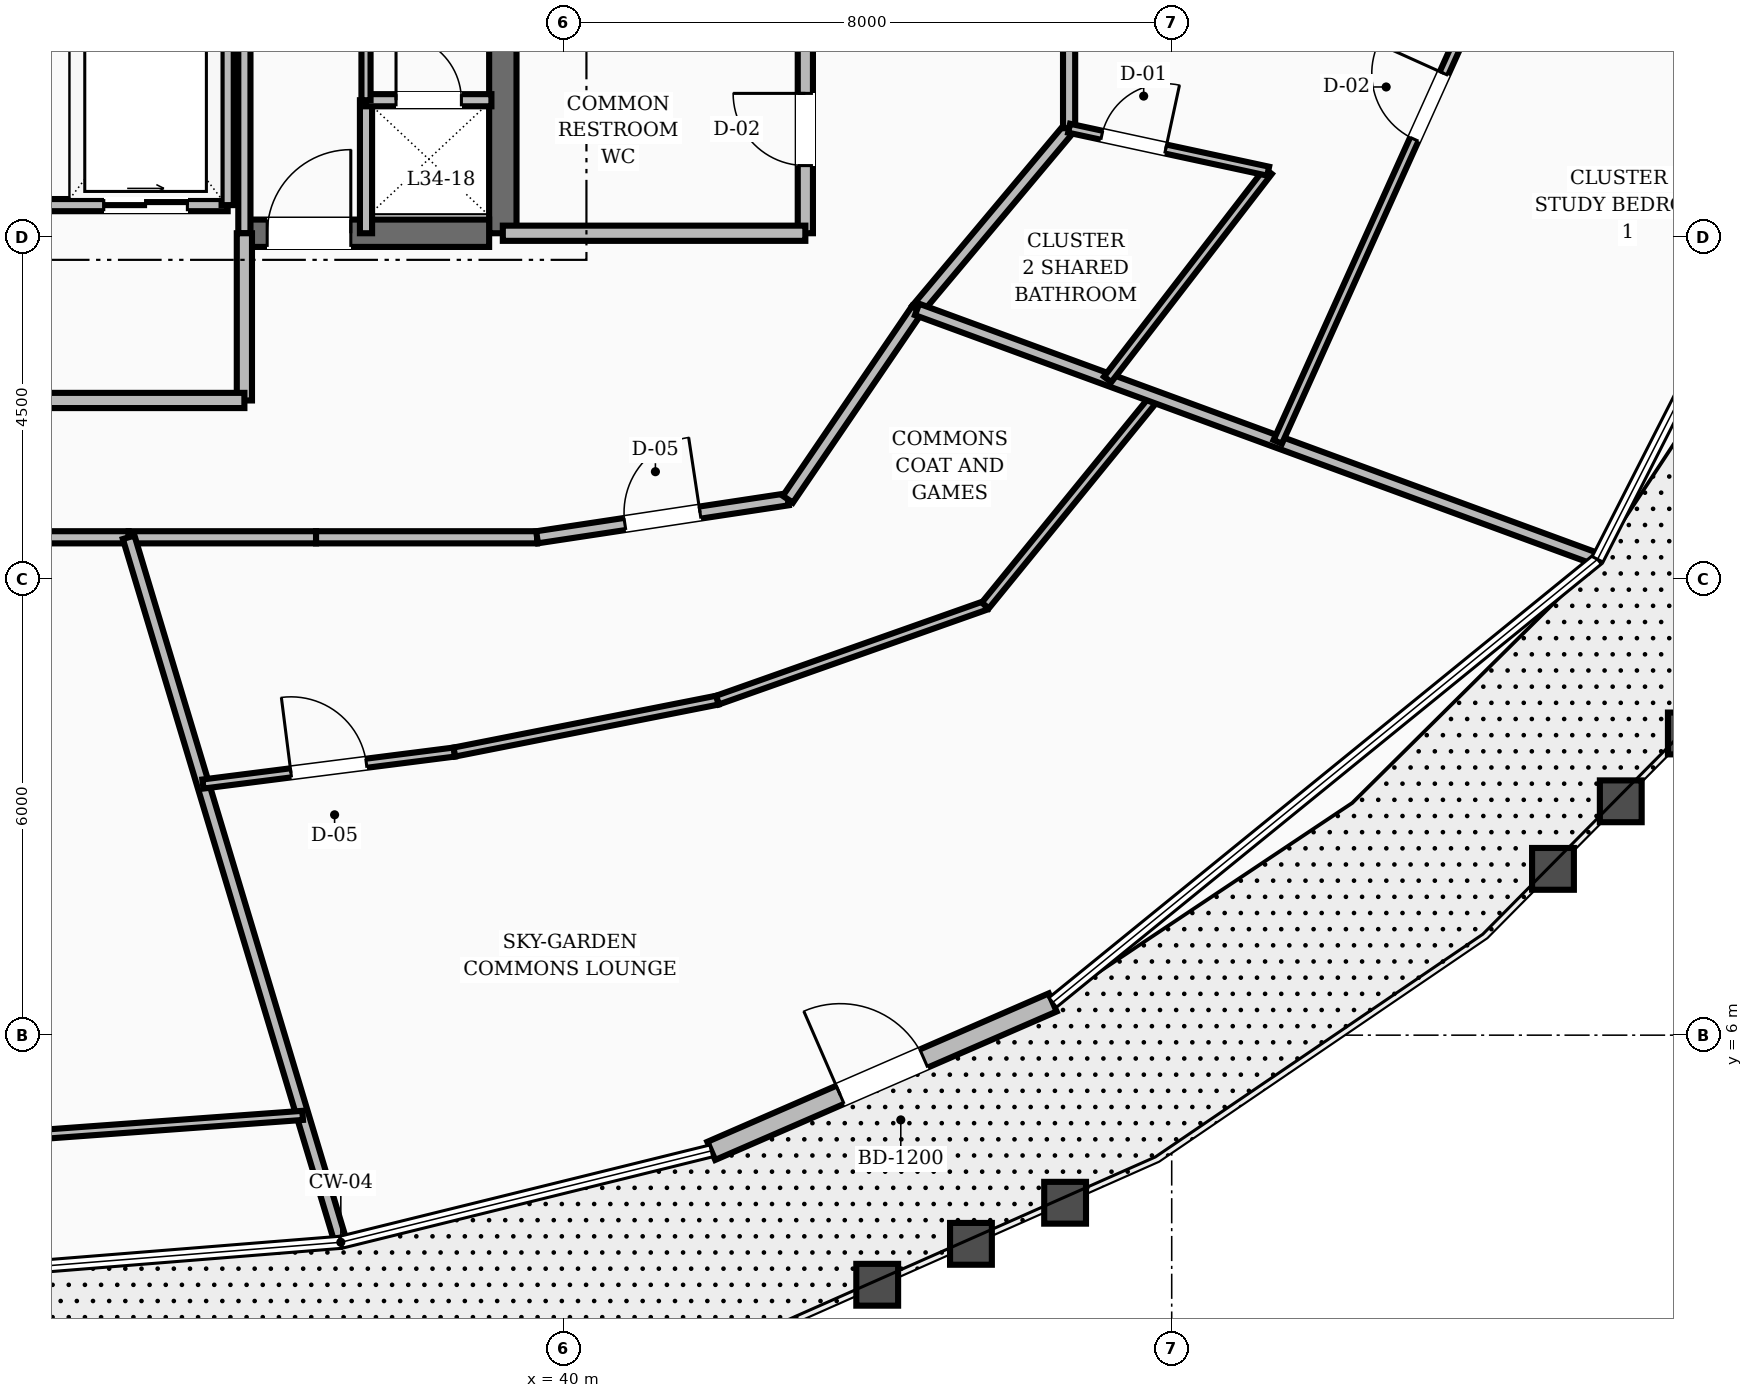
"""IFC4 building model, lengths in metres.
Left out: names, types, materials, properties, quantities, classifications, styles, units other than length and angle.
Written with IfcOpenShell. Run it as: python <this file> out.ifc"""

import sys

from ifc_helpers import new_model, si_unit, direction, frame, frame_2d, origin, place, context, subcontext, project, spatial, rectangle, extrude, element, fill, save


model = new_model("IFC4")
c1 = context("Model", 3, precision=1e-05, world=origin(), true_north=direction((0.0, 1.0)))
c2 = subcontext(c1, "Body", "Model", "MODEL_VIEW")
j1 = project(units=[si_unit("LENGTHUNIT", "METRE"), si_unit("PLANEANGLEUNIT", "RADIAN")], contexts=[c1])
p1 = place(None, origin())
s1 = spatial("IfcSite", under=j1, at=p1, CompositionType="ELEMENT")
p2 = place(p1, origin())
s2 = spatial("IfcBuilding", under=s1, at=p2, CompositionType="ELEMENT")
p3 = place(p2, frame((0.0, 0.0, 135.2)))
s3 = spatial("IfcBuildingStorey", under=s2, at=p3, CompositionType="ELEMENT", Elevation=135.2)
p4 = place(p3, frame((39.2, 16.55, 0.0), z_axis=(0.0, 0.0, 1.0), x_axis=(0.0, 1.0, 0.0)))
e1 = element("IfcWall", 1, at=p4, inside=s3, PredefinedType="SHEAR", context=c2, shape_type="SweptSolid", body=[
    extrude(rectangle(XDim=6.3, YDim=0.36, at=frame_2d((3.15, 0.0))), origin(), (0.0, 0.0, 1.0), 3.6),
])
p5 = place(p3, frame((35.8, 16.55, 0.0), z_axis=(0.0, 0.0, 1.0), x_axis=(1.0, 0.0, 0.0)))
e2 = element("IfcWall", 2, at=p5, inside=s3, PredefinedType="SHEAR", context=c2, shape_type="SweptSolid", body=[
    extrude(rectangle(XDim=3.22, YDim=0.36, at=frame_2d((1.61, 0.0))), origin(), (0.0, 0.0, 1.0), 3.6),
])
p6 = place(p5, frame((0.3, 0.0, 0.0)))
e3 = element("IfcOpeningElement", 3, at=p6, cuts=e2, PredefinedType="OPENING", context=c2, shape_type="SweptSolid", body=[
    extrude(rectangle(XDim=1.1, YDim=2.1, at=frame_2d((0.55, 1.05))), frame((0.0, 0.19, 0.0), z_axis=(0.0, -1.0, 0.0), x_axis=(1.0, 0.0, 0.0)), (0.0, 0.0, 1.0), 0.38),
])
p7 = place(p3, frame((41.943, 4.478, 0.0), z_axis=(0.0, 0.0, 1.0), x_axis=(0.917072433644, 0.39872064337, 0.0)))
e4 = element("IfcWall", 4, at=p7, inside=s3, PredefinedType="STANDARD", context=c2, shape_type="SweptSolid", body=[
    extrude(rectangle(XDim=4.898, YDim=0.26, at=frame_2d((2.449, 0.0))), origin(), (0.0, 0.0, 1.0), 2.82),
])
p8 = place(p7, frame((1.849, 0.0, 0.0)))
e5 = element("IfcOpeningElement", 5, at=p8, cuts=e4, PredefinedType="OPENING", context=c2, shape_type="SweptSolid", body=[
    extrude(rectangle(XDim=1.2, YDim=2.15, at=frame_2d((0.6, 1.075))), frame((0.0, 0.14, 0.0), z_axis=(0.0, -1.0, 0.0), x_axis=(1.0, 0.0, 0.0)), (0.0, 0.0, 1.0), 0.28),
])
p9 = place(p3, frame((43.18, 16.55, 0.0), z_axis=(0.0, 0.0, 1.0), x_axis=(0.0, 1.0, 0.0)))
e6 = element("IfcWall", 6, at=p9, inside=s3, PredefinedType="SOLIDWALL", context=c2, shape_type="SweptSolid", body=[
    extrude(rectangle(XDim=2.73, YDim=0.2, at=frame_2d((1.365, 0.0))), origin(), (0.0, 0.0, 1.0), 2.8),
])
p10 = place(p9, frame((0.89, 0.0, 0.0)))
e7 = element("IfcOpeningElement", 7, at=p10, cuts=e6, PredefinedType="OPENING", context=c2, shape_type="SweptSolid", body=[
    extrude(rectangle(XDim=0.95, YDim=2.1, at=frame_2d((0.475, 1.05))), frame((0.0, 0.11, 0.0), z_axis=(0.0, -1.0, 0.0), x_axis=(1.0, 0.0, 0.0)), (0.0, 0.0, 1.0), 0.22),
])
p11 = place(p3, frame((39.2, 16.55, 0.0), z_axis=(0.0, 0.0, 1.0), x_axis=(1.0, 0.0, 0.0)))
e8 = element("IfcWall", 8, at=p11, inside=s3, PredefinedType="SOLIDWALL", context=c2, shape_type="SweptSolid", body=[
    extrude(rectangle(XDim=3.98, YDim=0.2, at=frame_2d((1.99, 0.0))), origin(), (0.0, 0.0, 1.0), 2.8),
])
p12 = place(p3, frame((35.8, 16.55, 0.0), z_axis=(0.0, 0.0, 1.0), x_axis=(0.0, 1.0, 0.0)))
e9 = element("IfcWall", 9, at=p12, inside=s3, PredefinedType="SOLIDWALL", context=c2, shape_type="SweptSolid", body=[
    extrude(rectangle(XDim=3.3, YDim=0.16, at=frame_2d((1.65, 0.0))), origin(), (0.0, 0.0, 1.0), 2.8),
])
p13 = place(p3, frame((37.4, 16.55, 0.0), z_axis=(0.0, 0.0, 1.0), x_axis=(0.0, 1.0, 0.0)))
e10 = element("IfcWall", 10, at=p13, inside=s3, PredefinedType="SOLIDWALL", context=c2, shape_type="SweptSolid", body=[
    extrude(rectangle(XDim=1.75, YDim=0.16, at=frame_2d((0.875, 0.0))), origin(), (0.0, 0.0, 1.0), 2.8),
])
p14 = place(p3, frame((35.8, 14.35, 0.0), z_axis=(0.0, 0.0, 1.0), x_axis=(0.0, 1.0, 0.0)))
e11 = element("IfcWall", 11, at=p14, inside=s3, PredefinedType="SOLIDWALL", context=c2, shape_type="SweptSolid", body=[
    extrude(rectangle(XDim=2.2, YDim=0.2, at=frame_2d((1.1, 0.0))), origin(), (0.0, 0.0, 1.0), 2.8),
])
p15 = place(p3, frame((28.2, 14.35, 0.0), z_axis=(0.0, 0.0, 1.0), x_axis=(1.0, 0.0, 0.0)))
e12 = element("IfcWall", 12, at=p15, inside=s3, PredefinedType="SOLIDWALL", context=c2, shape_type="SweptSolid", body=[
    extrude(rectangle(XDim=7.6, YDim=0.2, at=frame_2d((3.8, 0.0))), origin(), (0.0, 0.0, 1.0), 2.8),
])
p16 = place(p15, frame((3.2, 0.0, 0.0)))
e13 = element("IfcOpeningElement", 13, at=p16, cuts=e12, PredefinedType="OPENING", context=c2, shape_type="SweptSolid", body=[
    extrude(rectangle(XDim=1.2, YDim=2.1, at=frame_2d((0.6, 1.05))), frame((0.0, 0.11, 0.0), z_axis=(0.0, -1.0, 0.0), x_axis=(1.0, 0.0, 0.0)), (0.0, 0.0, 1.0), 0.22),
])
p17 = place(p3, frame((28.42, 16.92, 0.0), z_axis=(0.0, 0.0, 1.0), x_axis=(1.0, 0.0, 0.0)))
e14 = element("IfcWall", 14, at=p17, inside=s3, PredefinedType="SOLIDWALL", context=c2, shape_type="SweptSolid", body=[
    extrude(rectangle(XDim=7.16, YDim=0.16, at=frame_2d((3.58, 0.0))), origin(), (0.0, 0.0, 1.0), 2.8),
])
p18 = place(p17, frame((0.53, 0.0, 0.0)))
e15 = element("IfcOpeningElement", 15, at=p18, cuts=e14, PredefinedType="OPENING", context=c2, shape_type="SweptSolid", body=[
    extrude(rectangle(XDim=1.1, YDim=2.15, at=frame_2d((0.55, 1.075))), frame((0.0, 0.09, 0.0), z_axis=(0.0, -1.0, 0.0), x_axis=(1.0, 0.0, 0.0)), (0.0, 0.0, 1.0), 0.18),
])
p19 = place(p17, frame((3.03, 0.0, 0.0)))
e16 = element("IfcOpeningElement", 16, at=p19, cuts=e14, PredefinedType="OPENING", context=c2, shape_type="SweptSolid", body=[
    extrude(rectangle(XDim=1.1, YDim=2.15, at=frame_2d((0.55, 1.075))), frame((0.0, 0.09, 0.0), z_axis=(0.0, -1.0, 0.0), x_axis=(1.0, 0.0, 0.0)), (0.0, 0.0, 1.0), 0.18),
])
p20 = place(p17, frame((5.53, 0.0, 0.0)))
e17 = element("IfcOpeningElement", 17, at=p20, cuts=e14, PredefinedType="OPENING", context=c2, shape_type="SweptSolid", body=[
    extrude(rectangle(XDim=1.1, YDim=2.15, at=frame_2d((0.55, 1.075))), frame((0.0, 0.09, 0.0), z_axis=(0.0, -1.0, 0.0), x_axis=(1.0, 0.0, 0.0)), (0.0, 0.0, 1.0), 0.18),
])
p21 = place(p3, frame((35.58, 16.92, 0.0), z_axis=(0.0, 0.0, 1.0), x_axis=(0.0, 1.0, 0.0)))
e18 = element("IfcWall", 18, at=p21, inside=s3, PredefinedType="SOLIDWALL", context=c2, shape_type="SweptSolid", body=[
    extrude(rectangle(XDim=2.76, YDim=0.16, at=frame_2d((1.38, 0.0))), origin(), (0.0, 0.0, 1.0), 2.8),
])
p22 = place(p3, frame((37.4, 18.3, 0.0), z_axis=(0.0, 0.0, 1.0), x_axis=(1.0, 0.0, 0.0)))
e19 = element("IfcWall", 19, at=p22, inside=s3, PredefinedType="SOLIDWALL", context=c2, shape_type="SweptSolid", body=[
    extrude(rectangle(XDim=1.65, YDim=0.16, at=frame_2d((0.825, 0.0))), origin(), (0.0, 0.0, 1.0), 2.8),
])
p23 = place(p22, frame((0.395, 0.0, 0.0)))
e20 = element("IfcOpeningElement", 20, at=p23, cuts=e19, PredefinedType="OPENING", context=c2, shape_type="SweptSolid", body=[
    extrude(rectangle(XDim=0.86, YDim=2.1, at=frame_2d((0.43, 1.05))), frame((0.0, 0.09, 0.0), z_axis=(0.0, -1.0, 0.0), x_axis=(1.0, 0.0, 0.0)), (0.0, 0.0, 1.0), 0.18),
])
p24 = place(p3, frame((37.4, 18.3, 0.0), z_axis=(0.0, 0.0, 1.0), x_axis=(0.0, 1.0, 0.0)))
e21 = element("IfcWall", 21, at=p24, inside=s3, PredefinedType="PARTITIONING", context=c2, shape_type="SweptSolid", body=[
    extrude(rectangle(XDim=4.45, YDim=0.12, at=frame_2d((2.225, 0.0))), origin(), (0.0, 0.0, 1.0), 2.8),
])
p25 = place(p24, frame((1.75, 0.0, 0.0)))
e22 = element("IfcOpeningElement", 22, at=p25, cuts=e21, PredefinedType="OPENING", context=c2, shape_type="SweptSolid", body=[
    extrude(rectangle(XDim=0.95, YDim=2.1, at=frame_2d((0.475, 1.05))), frame((0.0, 0.07, 0.0), z_axis=(0.0, -1.0, 0.0), x_axis=(1.0, 0.0, 0.0)), (0.0, 0.0, 1.0), 0.14),
])
p26 = place(p3, frame((32.0, 12.55, 0.0), z_axis=(0.0, 0.0, 1.0), x_axis=(1.0, 0.0, 0.0)))
e23 = element("IfcWall", 23, at=p26, inside=s3, PredefinedType="SOLIDWALL", context=c2, shape_type="SweptSolid", body=[
    extrude(rectangle(XDim=2.278, YDim=0.16, at=frame_2d((1.139, 0.0))), origin(), (0.0, 0.0, 1.0), 2.8),
])
p27 = place(p3, frame((34.278, 12.55, 0.0), z_axis=(0.0, 0.0, 1.0), x_axis=(1.0, 0.0, 0.0)))
e24 = element("IfcWall", 24, at=p27, inside=s3, PredefinedType="SOLIDWALL", context=c2, shape_type="SweptSolid", body=[
    extrude(rectangle(XDim=2.465, YDim=0.16, at=frame_2d((1.232, 0.0))), origin(), (0.0, 0.0, 1.0), 2.8),
])
p28 = place(p3, frame((36.743, 12.55, 0.0), z_axis=(0.0, 0.0, 1.0), x_axis=(1.0, 0.0, 0.0)))
e25 = element("IfcWall", 25, at=p28, inside=s3, PredefinedType="SOLIDWALL", context=c2, shape_type="SweptSolid", body=[
    extrude(rectangle(XDim=2.908, YDim=0.16, at=frame_2d((1.454, 0.0))), origin(), (0.0, 0.0, 1.0), 2.8),
])
p29 = place(p3, frame((39.651, 12.55, 0.0), z_axis=(0.0, 0.0, 1.0), x_axis=(0.988710906508, 0.149835721217, 0.0)))
e26 = element("IfcWall", 26, at=p29, inside=s3, PredefinedType="SOLIDWALL", context=c2, shape_type="SweptSolid", body=[
    extrude(rectangle(XDim=3.337, YDim=0.16, at=frame_2d((1.668, 0.0))), origin(), (0.0, 0.0, 1.0), 2.8),
])
p30 = place(p29, frame((1.168, 0.0, 0.0)))
e27 = element("IfcOpeningElement", 27, at=p30, cuts=e26, PredefinedType="OPENING", context=c2, shape_type="SweptSolid", body=[
    extrude(rectangle(XDim=1.0, YDim=2.1, at=frame_2d((0.5, 1.05))), frame((0.0, 0.09, 0.0), z_axis=(0.0, -1.0, 0.0), x_axis=(1.0, 0.0, 0.0)), (0.0, 0.0, 1.0), 0.18),
])
p31 = place(p3, frame((42.95, 13.05, 0.0), z_axis=(0.0, 0.0, 1.0), x_axis=(0.562674669208, 0.826678423955, 0.0)))
e28 = element("IfcWall", 28, at=p31, inside=s3, PredefinedType="SOLIDWALL", context=c2, shape_type="SweptSolid", body=[
    extrude(rectangle(XDim=3.021, YDim=0.16, at=frame_2d((1.511, 0.0))), origin(), (0.0, 0.0, 1.0), 2.8),
])
p32 = place(p3, frame((44.65, 15.548, 0.0), z_axis=(0.0, 0.0, 1.0), x_axis=(0.642665742791, 0.76614668507, 0.0)))
e29 = element("IfcWall", 29, at=p32, inside=s3, PredefinedType="SOLIDWALL", context=c2, shape_type="SweptSolid", body=[
    extrude(rectangle(XDim=3.112, YDim=0.16, at=frame_2d((1.556, 0.0))), origin(), (0.0, 0.0, 1.0), 2.8),
])
p33 = place(p3, frame((46.65, 17.932, 0.0), z_axis=(0.0, 0.0, 1.0), x_axis=(0.0, 1.0, 0.0)))
e30 = element("IfcWall", 30, at=p33, inside=s3, PredefinedType="SOLIDWALL", context=c2, shape_type="SweptSolid", body=[
    extrude(rectangle(XDim=3.154, YDim=0.16, at=frame_2d((1.577, 0.0))), origin(), (0.0, 0.0, 1.0), 2.8),
])
p34 = place(p33, frame((1.077, 0.0, 0.0)))
e31 = element("IfcOpeningElement", 31, at=p34, cuts=e30, PredefinedType="OPENING", context=c2, shape_type="SweptSolid", body=[
    extrude(rectangle(XDim=1.0, YDim=2.1, at=frame_2d((0.5, 1.05))), frame((0.0, 0.09, 0.0), z_axis=(0.0, -1.0, 0.0), x_axis=(1.0, 0.0, 0.0)), (0.0, 0.0, 1.0), 0.18),
])
p35 = place(p3, frame((34.278, 12.55, 0.0), z_axis=(0.0, 0.0, 1.0), x_axis=(0.288156704698, -0.957583267156, 0.0)))
e32 = element("IfcWall", 32, at=p35, inside=s3, PredefinedType="SOLIDWALL", context=c2, shape_type="SweptSolid", body=[
    extrude(rectangle(XDim=9.636, YDim=0.16, at=frame_2d((4.818, 0.0))), origin(), (0.0, 0.0, 1.0), 2.8),
])
p36 = place(p3, frame((35.254, 9.304, 0.0), z_axis=(0.0, 0.0, 1.0), x_axis=(0.99200407845, 0.126205817375, 0.0)))
e33 = element("IfcWall", 33, at=p36, inside=s3, PredefinedType="PARTITIONING", context=c2, shape_type="SweptSolid", body=[
    extrude(rectangle(XDim=3.335, YDim=0.12, at=frame_2d((1.667, 0.0))), origin(), (0.0, 0.0, 1.0), 2.8),
])
p37 = place(p36, frame((1.167, 0.0, 0.0)))
e34 = element("IfcOpeningElement", 34, at=p37, cuts=e33, PredefinedType="OPENING", context=c2, shape_type="SweptSolid", body=[
    extrude(rectangle(XDim=1.0, YDim=2.1, at=frame_2d((0.5, 1.05))), frame((0.0, 0.07, 0.0), z_axis=(0.0, -1.0, 0.0), x_axis=(1.0, 0.0, 0.0)), (0.0, 0.0, 1.0), 0.14),
])
p38 = place(p3, frame((38.563, 9.725, 0.0), z_axis=(0.0, 0.0, 1.0), x_axis=(0.981059326884, 0.193707504074, 0.0)))
e35 = element("IfcWall", 35, at=p38, inside=s3, PredefinedType="PARTITIONING", context=c2, shape_type="SweptSolid", body=[
    extrude(rectangle(XDim=3.529, YDim=0.12, at=frame_2d((1.765, 0.0))), origin(), (0.0, 0.0, 1.0), 2.8),
])
p39 = place(p3, frame((42.025, 10.408, 0.0), z_axis=(0.0, 0.0, 1.0), x_axis=(0.942879293263, 0.333134564908, 0.0)))
e36 = element("IfcWall", 36, at=p39, inside=s3, PredefinedType="PARTITIONING", context=c2, shape_type="SweptSolid", body=[
    extrude(rectangle(XDim=3.736, YDim=0.12, at=frame_2d((1.868, 0.0))), origin(), (0.0, 0.0, 1.0), 2.8),
])
p40 = place(p3, frame((45.548, 11.653, 0.0), z_axis=(0.0, 0.0, 1.0), x_axis=(0.631651457384, 0.775252498471, 0.0)))
e37 = element("IfcWall", 37, at=p40, inside=s3, PredefinedType="PARTITIONING", context=c2, shape_type="SweptSolid", body=[
    extrude(rectangle(XDim=3.54, YDim=0.12, at=frame_2d((1.77, 0.0))), origin(), (0.0, 0.0, 1.0), 2.8),
])
p41 = place(p3, frame((44.65, 15.548, 0.0), z_axis=(0.0, 0.0, 1.0), x_axis=(0.938723462169, -0.344671236939, 0.0)))
e38 = element("IfcWall", 38, at=p41, inside=s3, PredefinedType="SOLIDWALL", context=c2, shape_type="SweptSolid", body=[
    extrude(rectangle(XDim=9.487, YDim=0.16, at=frame_2d((4.744, 0.0))), origin(), (0.0, 0.0, 1.0), 2.8),
])
p42 = place(p3, frame((47.157, 14.627, 0.0), z_axis=(0.0, 0.0, 1.0), x_axis=(0.610617608408, 0.791925587604, 0.0)))
e39 = element("IfcWall", 39, at=p42, inside=s3, PredefinedType="PARTITIONING", context=c2, shape_type="SweptSolid", body=[
    extrude(rectangle(XDim=3.459, YDim=0.12, at=frame_2d((1.729, 0.0))), origin(), (0.0, 0.0, 1.0), 2.8),
])
p43 = place(p3, frame((46.65, 17.932, 0.0), z_axis=(0.0, 0.0, 1.0), x_axis=(0.97750005093, -0.21093518064, 0.0)))
e40 = element("IfcWall", 40, at=p43, inside=s3, PredefinedType="PARTITIONING", context=c2, shape_type="SweptSolid", body=[
    extrude(rectangle(XDim=2.679, YDim=0.12, at=frame_2d((1.34, 0.0))), origin(), (0.0, 0.0, 1.0), 2.8),
])
p44 = place(p43, frame((0.44, 0.0, 0.0)))
e41 = element("IfcOpeningElement", 41, at=p44, cuts=e40, PredefinedType="OPENING", context=c2, shape_type="SweptSolid", body=[
    extrude(rectangle(XDim=0.86, YDim=2.1, at=frame_2d((0.43, 1.05))), frame((0.0, 0.07, 0.0), z_axis=(0.0, -1.0, 0.0), x_axis=(1.0, 0.0, 0.0)), (0.0, 0.0, 1.0), 0.14),
])
p45 = place(p3, frame((49.395, 13.805, 0.0), z_axis=(0.0, 0.0, 1.0), x_axis=(0.411281396403, 0.911508427264, 0.0)))
e42 = element("IfcWall", 42, at=p45, inside=s3, PredefinedType="PARTITIONING", context=c2, shape_type="SweptSolid", body=[
    extrude(rectangle(XDim=7.285, YDim=0.12, at=frame_2d((3.642, 0.0))), origin(), (0.0, 0.0, 1.0), 2.8),
])
p46 = place(p45, frame((4.367, 0.0, 0.0)))
e43 = element("IfcOpeningElement", 43, at=p46, cuts=e42, PredefinedType="OPENING", context=c2, shape_type="SweptSolid", body=[
    extrude(rectangle(XDim=0.95, YDim=2.1, at=frame_2d((0.475, 1.05))), frame((0.0, 0.07, 0.0), z_axis=(0.0, -1.0, 0.0), x_axis=(1.0, 0.0, 0.0)), (0.0, 0.0, 1.0), 0.14),
])
p47 = place(p3, frame((32.0, 4.612, 0.0), z_axis=(0.0, 0.0, 1.0), x_axis=(0.99735535591, 0.072679392114, 0.0)))
e44 = element("IfcWall", 44, at=p47, inside=s3, PredefinedType="PARTITIONING", context=c2, shape_type="SweptSolid", body=[
    extrude(rectangle(XDim=4.579, YDim=0.12, at=frame_2d((2.289, 0.0))), origin(), (0.0, 0.0, 1.0), 2.8),
])
p48 = place(p8, origin())
e45 = element("IfcDoor", 45, at=p48, inside=s3, OperationType="SINGLE_SWING_LEFT", PredefinedType="DOOR", context=c2, shape_type="SweptSolid", body=[
    extrude(rectangle(XDim=1.2, YDim=2.15, at=frame_2d((0.6, 1.075))), frame((0.0, 0.025, 0.0), z_axis=(0.0, -1.0, 0.0), x_axis=(1.0, 0.0, 0.0)), (0.0, 0.0, 1.0), 0.05),
])
fill(e5, e45)
p49 = place(p10, origin())
e46 = element("IfcDoor", 46, at=p49, inside=s3, OperationType="SINGLE_SWING_RIGHT", PredefinedType="DOOR", context=c2, shape_type="SweptSolid", body=[
    extrude(rectangle(XDim=0.95, YDim=2.1, at=frame_2d((0.475, 1.05))), frame((0.0, 0.025, 0.0), z_axis=(0.0, -1.0, 0.0), x_axis=(1.0, 0.0, 0.0)), (0.0, 0.0, 1.0), 0.05),
])
fill(e7, e46)
p50 = place(p6, origin())
e47 = element("IfcDoor", 47, at=p50, inside=s3, OperationType="SINGLE_SWING_RIGHT", PredefinedType="DOOR", context=c2, shape_type="SweptSolid", body=[
    extrude(rectangle(XDim=1.1, YDim=2.1, at=frame_2d((0.55, 1.05))), frame((0.0, 0.025, 0.0), z_axis=(0.0, -1.0, 0.0), x_axis=(1.0, 0.0, 0.0)), (0.0, 0.0, 1.0), 0.05),
])
fill(e3, e47)
p51 = place(p20, origin())
e48 = element("IfcDoor", 48, at=p51, inside=s3, OperationType="SLIDING_TO_RIGHT", PredefinedType="DOOR", context=c2, shape_type="SweptSolid", body=[
    extrude(rectangle(XDim=1.1, YDim=2.15, at=frame_2d((0.55, 1.075))), frame((0.0, 0.025, 0.0), z_axis=(0.0, -1.0, 0.0), x_axis=(1.0, 0.0, 0.0)), (0.0, 0.0, 1.0), 0.05),
])
fill(e17, e48)
p52 = place(p23, origin())
e49 = element("IfcDoor", 49, at=p52, inside=s3, OperationType="SINGLE_SWING_LEFT", PredefinedType="TRAPDOOR", context=c2, shape_type="SweptSolid", body=[
    extrude(rectangle(XDim=0.86, YDim=2.1, at=frame_2d((0.43, 1.05))), frame((0.0, 0.025, 0.0), z_axis=(0.0, -1.0, 0.0), x_axis=(1.0, 0.0, 0.0)), (0.0, 0.0, 1.0), 0.05),
])
fill(e20, e49)
p53 = place(p30, origin())
e50 = element("IfcDoor", 50, at=p53, inside=s3, OperationType="SINGLE_SWING_RIGHT", PredefinedType="DOOR", context=c2, shape_type="SweptSolid", body=[
    extrude(rectangle(XDim=1.0, YDim=2.1, at=frame_2d((0.5, 1.05))), frame((0.0, 0.025, 0.0), z_axis=(0.0, -1.0, 0.0), x_axis=(1.0, 0.0, 0.0)), (0.0, 0.0, 1.0), 0.05),
])
fill(e27, e50)
p54 = place(p37, origin())
e51 = element("IfcDoor", 51, at=p54, inside=s3, OperationType="SINGLE_SWING_LEFT", PredefinedType="DOOR", context=c2, shape_type="SweptSolid", body=[
    extrude(rectangle(XDim=1.0, YDim=2.1, at=frame_2d((0.5, 1.05))), frame((0.0, 0.025, 0.0), z_axis=(0.0, -1.0, 0.0), x_axis=(1.0, 0.0, 0.0)), (0.0, 0.0, 1.0), 0.05),
])
fill(e34, e51)
p55 = place(p44, origin())
e52 = element("IfcDoor", 52, at=p55, inside=s3, OperationType="SINGLE_SWING_RIGHT", PredefinedType="DOOR", context=c2, shape_type="SweptSolid", body=[
    extrude(rectangle(XDim=0.86, YDim=2.1, at=frame_2d((0.43, 1.05))), frame((0.0, 0.025, 0.0), z_axis=(0.0, -1.0, 0.0), x_axis=(1.0, 0.0, 0.0)), (0.0, 0.0, 1.0), 0.05),
])
fill(e41, e52)
p56 = place(p46, origin())
e53 = element("IfcDoor", 53, at=p56, inside=s3, OperationType="SINGLE_SWING_RIGHT", PredefinedType="DOOR", context=c2, shape_type="SweptSolid", body=[
    extrude(rectangle(XDim=0.95, YDim=2.1, at=frame_2d((0.475, 1.05))), frame((0.0, 0.025, 0.0), z_axis=(0.0, -1.0, 0.0), x_axis=(1.0, 0.0, 0.0)), (0.0, 0.0, 1.0), 0.05),
])
fill(e43, e53)
save(model, sys.argv[1])
